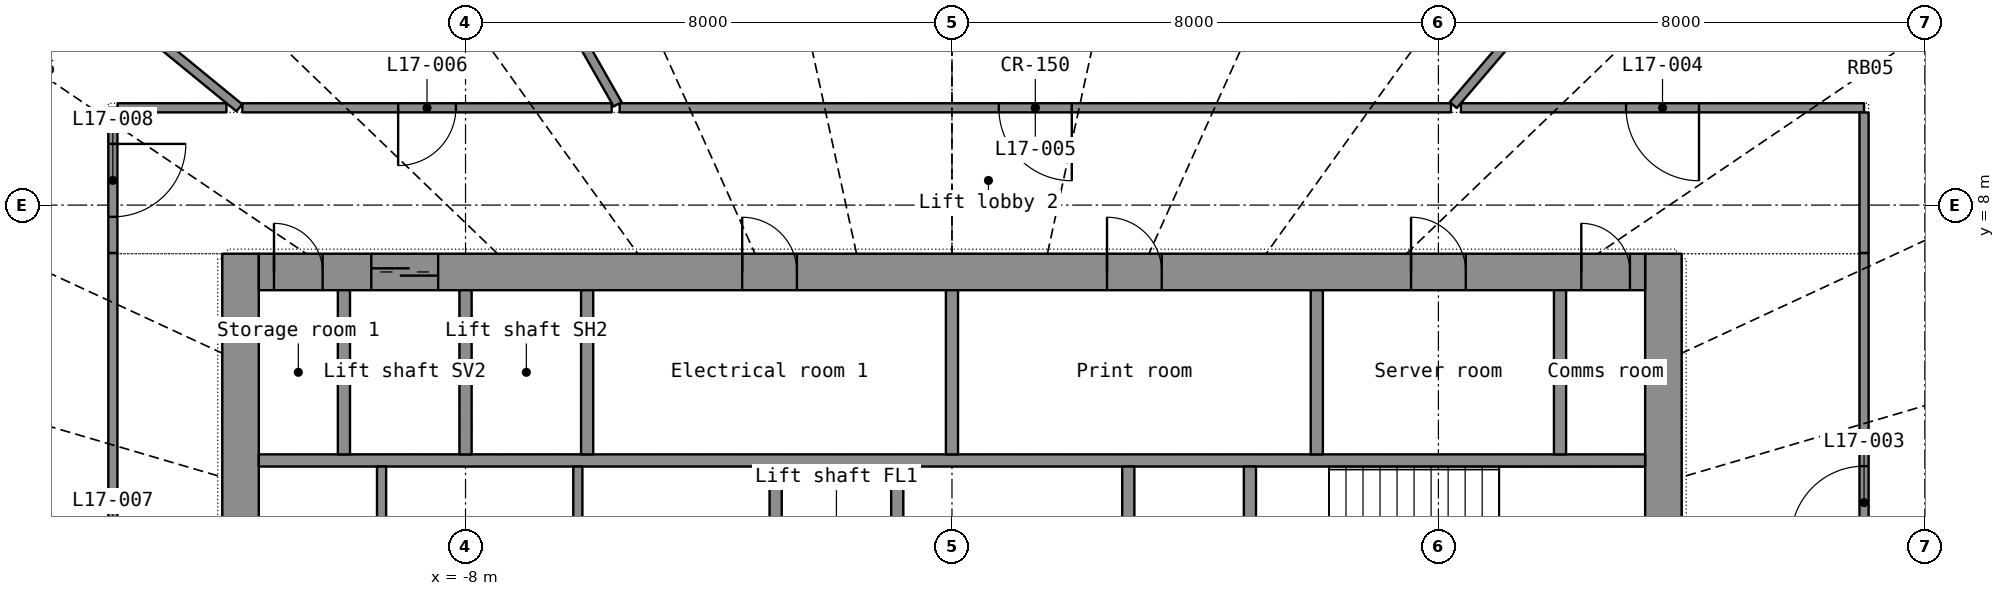
"""IFC4 building model, lengths in metres.
Left out: names, types, materials, properties, quantities, classifications, styles, units other than length and angle.
Written with IfcOpenShell. Run it as: python <this file> out.ifc"""

import sys

from ifc_helpers import new_model, si_unit, direction, frame, frame_2d, origin, place, context, subcontext, project, spatial, rectangle, extrude, element, fill, save


model = new_model("IFC4")
c1 = context("Model", 3, precision=1e-05, world=origin(), true_north=direction((0.0, 1.0)))
c2 = subcontext(c1, "Body", "Model", "MODEL_VIEW")
j1 = project(units=[si_unit("LENGTHUNIT", "METRE"), si_unit("PLANEANGLEUNIT", "RADIAN")], contexts=[c1])
p1 = place(None, origin())
s1 = spatial("IfcSite", under=j1, at=p1, CompositionType="ELEMENT")
p2 = place(p1, origin())
s2 = spatial("IfcBuilding", under=s1, at=p2, CompositionType="ELEMENT")
p3 = place(p2, frame((0.0, 0.0, 74.1)))
s3 = spatial("IfcBuildingStorey", under=s2, at=p3, CompositionType="ELEMENT", Elevation=74.1)
p4 = place(p3, frame((-11.7, -7.2, 0.0), z_axis=(0.0, 0.0, 1.0), x_axis=(0.0, 1.0, 0.0)))
e1 = element("IfcWall", 1, at=p4, inside=s3, PredefinedType="SHEAR", context=c2, shape_type="SweptSolid", body=[
    extrude(rectangle(XDim=14.4, YDim=0.6, at=frame_2d((7.2, 0.0))), origin(), (0.0, 0.0, 1.0), 3.3),
])
p5 = place(p4, frame((6.5, 0.0, 0.0)))
e2 = element("IfcOpeningElement", 2, at=p5, cuts=e1, PredefinedType="OPENING", context=c2, shape_type="SweptSolid", body=[
    extrude(rectangle(XDim=1.4, YDim=2.2, at=frame_2d((0.7, 1.1))), frame((0.0, 0.31, 0.0), z_axis=(0.0, -1.0, 0.0), x_axis=(1.0, 0.0, 0.0)), (0.0, 0.0, 1.0), 0.62),
])
p6 = place(p3, frame((11.7, -7.2, 0.0), z_axis=(0.0, 0.0, 1.0), x_axis=(0.0, 1.0, 0.0)))
e3 = element("IfcWall", 3, at=p6, inside=s3, PredefinedType="SHEAR", context=c2, shape_type="SweptSolid", body=[
    extrude(rectangle(XDim=14.4, YDim=0.6, at=frame_2d((7.2, 0.0))), origin(), (0.0, 0.0, 1.0), 3.3),
])
p7 = place(p6, frame((6.5, 0.0, 0.0)))
e4 = element("IfcOpeningElement", 4, at=p7, cuts=e3, PredefinedType="OPENING", context=c2, shape_type="SweptSolid", body=[
    extrude(rectangle(XDim=1.4, YDim=2.2, at=frame_2d((0.7, 1.1))), frame((0.0, 0.31, 0.0), z_axis=(0.0, -1.0, 0.0), x_axis=(1.0, 0.0, 0.0)), (0.0, 0.0, 1.0), 0.62),
])
p8 = place(p3, frame((-11.4, 6.9, 0.0), z_axis=(0.0, 0.0, 1.0), x_axis=(1.0, 0.0, 0.0)))
e5 = element("IfcWall", 5, at=p8, inside=s3, PredefinedType="SHEAR", context=c2, shape_type="SweptSolid", body=[
    extrude(rectangle(XDim=22.8, YDim=0.6, at=frame_2d((11.4, 0.0))), origin(), (0.0, 0.0, 1.0), 3.3),
])
p9 = place(p8, frame((1.85, 0.0, 0.0)))
e6 = element("IfcOpeningElement", 6, at=p9, cuts=e5, PredefinedType="OPENING", context=c2, shape_type="SweptSolid", body=[
    extrude(rectangle(XDim=1.1, YDim=2.2, at=frame_2d((0.55, 1.1))), frame((0.0, 0.31, 0.0), z_axis=(0.0, -1.0, 0.0), x_axis=(1.0, 0.0, 0.0)), (0.0, 0.0, 1.0), 0.62),
])
p10 = place(p8, frame((7.95, 0.0, 0.0)))
e7 = element("IfcOpeningElement", 7, at=p10, cuts=e5, PredefinedType="OPENING", context=c2, shape_type="SweptSolid", body=[
    extrude(rectangle(XDim=0.9, YDim=2.1, at=frame_2d((0.45, 1.05))), frame((0.0, 0.31, 0.0), z_axis=(0.0, -1.0, 0.0), x_axis=(1.0, 0.0, 0.0)), (0.0, 0.0, 1.0), 0.62),
])
p11 = place(p8, frame((13.95, 0.0, 0.0)))
e8 = element("IfcOpeningElement", 8, at=p11, cuts=e5, PredefinedType="OPENING", context=c2, shape_type="SweptSolid", body=[
    extrude(rectangle(XDim=0.9, YDim=2.1, at=frame_2d((0.45, 1.05))), frame((0.0, 0.31, 0.0), z_axis=(0.0, -1.0, 0.0), x_axis=(1.0, 0.0, 0.0)), (0.0, 0.0, 1.0), 0.62),
])
p12 = place(p8, frame((18.95, 0.0, 0.0)))
e9 = element("IfcOpeningElement", 9, at=p12, cuts=e5, PredefinedType="OPENING", context=c2, shape_type="SweptSolid", body=[
    extrude(rectangle(XDim=0.9, YDim=2.1, at=frame_2d((0.45, 1.05))), frame((0.0, 0.31, 0.0), z_axis=(0.0, -1.0, 0.0), x_axis=(1.0, 0.0, 0.0)), (0.0, 0.0, 1.0), 0.62),
])
p13 = place(p8, frame((0.25, 0.0, 0.0)))
e10 = element("IfcOpeningElement", 10, at=p13, cuts=e5, PredefinedType="OPENING", context=c2, shape_type="SweptSolid", body=[
    extrude(rectangle(XDim=0.8, YDim=2.05, at=frame_2d((0.4, 1.025))), frame((0.0, 0.31, 0.0), z_axis=(0.0, -1.0, 0.0), x_axis=(1.0, 0.0, 0.0)), (0.0, 0.0, 1.0), 0.62),
])
p14 = place(p8, frame((21.75, 0.0, 0.0)))
e11 = element("IfcOpeningElement", 11, at=p14, cuts=e5, PredefinedType="OPENING", context=c2, shape_type="SweptSolid", body=[
    extrude(rectangle(XDim=0.8, YDim=2.05, at=frame_2d((0.4, 1.025))), frame((0.0, 0.31, 0.0), z_axis=(0.0, -1.0, 0.0), x_axis=(1.0, 0.0, 0.0)), (0.0, 0.0, 1.0), 0.62),
])
p15 = place(p3, frame((-11.4, 3.8, 0.0), z_axis=(0.0, 0.0, 1.0), x_axis=(1.0, 0.0, 0.0)))
e12 = element("IfcWall", 12, at=p15, inside=s3, PredefinedType="SHEAR", context=c2, shape_type="SweptSolid", body=[
    extrude(rectangle(XDim=22.8, YDim=0.2, at=frame_2d((11.4, 0.0))), origin(), (0.0, 0.0, 1.0), 3.3),
])
for number, where, z_axis, x_axis in (
    (13, (-10.0, 3.9, 0.0), (0.0, 0.0, 1.0), (0.0, 1.0, 0.0)),
    (14, (-8.0, 3.9, 0.0), (0.0, 0.0, 1.0), (0.0, 1.0, 0.0)),
    (15, (-6.0, 3.9, 0.0), (0.0, 0.0, 1.0), (0.0, 1.0, 0.0)),
    (16, (10.0, 3.9, 0.0), (0.0, 0.0, 1.0), (0.0, 1.0, 0.0)),
):
    element("IfcWall", number, at=place(p3, frame(where, z_axis=z_axis, x_axis=x_axis)), inside=s3, PredefinedType="SHEAR", context=c2, shape_type="SweptSolid", body=[
        extrude(rectangle(XDim=2.7, YDim=0.2, at=frame_2d((1.35, 0.0))), origin(), (0.0, 0.0, 1.0), 3.3),
    ])
for number, where, z_axis, x_axis in (
    (17, (0.0, 3.9, 0.0), (0.0, 0.0, 1.0), (0.0, 1.0, 0.0)),
    (18, (6.0, 3.9, 0.0), (0.0, 0.0, 1.0), (0.0, 1.0, 0.0)),
):
    element("IfcWall", number, at=place(p3, frame(where, z_axis=z_axis, x_axis=x_axis)), inside=s3, PredefinedType="PARTITIONING", context=c2, shape_type="SweptSolid", body=[
        extrude(rectangle(XDim=2.7, YDim=0.2, at=frame_2d((1.35, 0.0))), origin(), (0.0, 0.0, 1.0), 3.3),
    ])
p16 = place(p3, frame((-2.9, -3.7, 0.0), z_axis=(0.0, 0.0, 1.0), x_axis=(0.0, 1.0, 0.0)))
e19 = element("IfcWall", 19, at=p16, inside=s3, PredefinedType="SHEAR", context=c2, shape_type="SweptSolid", body=[
    extrude(rectangle(XDim=7.4, YDim=0.2, at=frame_2d((3.7, 0.0))), origin(), (0.0, 0.0, 1.0), 3.3),
])
p17 = place(p16, frame((3.1, 0.0, 0.0)))
e20 = element("IfcOpeningElement", 20, at=p17, cuts=e19, PredefinedType="OPENING", context=c2, shape_type="SweptSolid", body=[
    extrude(rectangle(XDim=1.2, YDim=2.2, at=frame_2d((0.6, 1.1))), frame((0.0, 0.11, 0.0), z_axis=(0.0, -1.0, 0.0), x_axis=(1.0, 0.0, 0.0)), (0.0, 0.0, 1.0), 0.22),
])
p18 = place(p3, frame((2.9, -3.7, 0.0), z_axis=(0.0, 0.0, 1.0), x_axis=(0.0, 1.0, 0.0)))
e21 = element("IfcWall", 21, at=p18, inside=s3, PredefinedType="SHEAR", context=c2, shape_type="SweptSolid", body=[
    extrude(rectangle(XDim=7.4, YDim=0.2, at=frame_2d((3.7, 0.0))), origin(), (0.0, 0.0, 1.0), 3.3),
])
p19 = place(p18, frame((3.1, 0.0, 0.0)))
e22 = element("IfcOpeningElement", 22, at=p19, cuts=e21, PredefinedType="OPENING", context=c2, shape_type="SweptSolid", body=[
    extrude(rectangle(XDim=1.2, YDim=2.2, at=frame_2d((0.6, 1.1))), frame((0.0, 0.11, 0.0), z_axis=(0.0, -1.0, 0.0), x_axis=(1.0, 0.0, 0.0)), (0.0, 0.0, 1.0), 0.22),
])
for number, where, z_axis, x_axis in (
    (23, (-0.9, 1.35, 0.0), (0.0, 0.0, 1.0), (0.0, 1.0, 0.0)),
    (24, (4.9, 1.35, 0.0), (0.0, 0.0, 1.0), (0.0, 1.0, 0.0)),
):
    element("IfcWall", number, at=place(p3, frame(where, z_axis=z_axis, x_axis=x_axis)), inside=s3, PredefinedType="SHEAR", context=c2, shape_type="SweptSolid", body=[
        extrude(rectangle(XDim=2.35, YDim=0.2, at=frame_2d((1.175, 0.0))), origin(), (0.0, 0.0, 1.0), 3.3),
    ])
for number, where, z_axis, x_axis in (
    (25, (-9.381, 1.35, 0.0), (0.0, 0.0, 1.0), (0.0, 1.0, 0.0)),
    (26, (-6.153, 1.35, 0.0), (0.0, 0.0, 1.0), (0.0, 1.0, 0.0)),
):
    element("IfcWall", number, at=place(p3, frame(where, z_axis=z_axis, x_axis=x_axis)), inside=s3, PredefinedType="PARTITIONING", context=c2, shape_type="SweptSolid", body=[
        extrude(rectangle(XDim=2.35, YDim=0.15, at=frame_2d((1.175, 0.0))), origin(), (0.0, 0.0, 1.0), 3.3),
    ])
p20 = place(p3, frame((8.206, 9.6, 0.0), z_axis=(0.0, 0.0, 1.0), x_axis=(-1.0, 0.0, 0.0)))
e27 = element("IfcWall", 27, at=p20, inside=s3, PredefinedType="PARTITIONING", context=c2, shape_type="SweptSolid", body=[
    extrude(rectangle(XDim=13.671, YDim=0.15, at=frame_2d((6.836, 0.0))), origin(), (0.0, 0.0, 1.0), 2.4),
])
p21 = place(p20, frame((6.236, 0.0, 0.0)))
e28 = element("IfcOpeningElement", 28, at=p21, cuts=e27, PredefinedType="OPENING", context=c2, shape_type="SweptSolid", body=[
    extrude(rectangle(XDim=1.2, YDim=2.2, at=frame_2d((0.6, 1.1))), frame((0.0, 0.085, 0.0), z_axis=(0.0, -1.0, 0.0), x_axis=(1.0, 0.0, 0.0)), (0.0, 0.0, 1.0), 0.17),
])
p22 = place(p3, frame((-11.314, 19.874, 0.0), z_axis=(0.0, 0.0, 1.0), x_axis=(0.49473362, -0.869044674, 0.0)))
e29 = element("IfcWall", 29, at=p22, inside=s3, PredefinedType="PARTITIONING", context=c2, shape_type="SweptSolid", body=[
    extrude(rectangle(XDim=11.755, YDim=0.15, at=frame_2d((5.877, 0.0))), origin(), (0.0, 0.0, 1.0), 2.4),
])
p23 = place(p3, frame((15.357, 17.965, 0.0), z_axis=(0.0, 0.0, 1.0), x_axis=(-0.649780526, -0.760121877, 0.0)))
e30 = element("IfcWall", 30, at=p23, inside=s3, PredefinedType="PARTITIONING", context=c2, shape_type="SweptSolid", body=[
    extrude(rectangle(XDim=10.946, YDim=0.15, at=frame_2d((5.473, 0.0))), origin(), (0.0, 0.0, 1.0), 2.4),
])
p24 = place(p3, frame((-13.8, 7.212, 0.0), z_axis=(0.0, 0.0, 1.0), x_axis=(0.0, -1.0, 0.0)))
e31 = element("IfcWall", 31, at=p24, inside=s3, PredefinedType="PARTITIONING", context=c2, shape_type="SweptSolid", body=[
    extrude(rectangle(XDim=10.166, YDim=0.15, at=frame_2d((5.083, 0.0))), origin(), (0.0, 0.0, 1.0), 2.4),
])
p25 = place(p24, frame((4.483, 0.0, 0.0)))
e32 = element("IfcOpeningElement", 32, at=p25, cuts=e31, PredefinedType="OPENING", context=c2, shape_type="SweptSolid", body=[
    extrude(rectangle(XDim=1.2, YDim=2.2, at=frame_2d((0.6, 1.1))), frame((0.0, 0.085, 0.0), z_axis=(0.0, -1.0, 0.0), x_axis=(1.0, 0.0, 0.0)), (0.0, 0.0, 1.0), 0.17),
])
p26 = place(p3, frame((-18.937, 15.511, 0.0), z_axis=(0.0, 0.0, 1.0), x_axis=(0.773614383, -0.633656678, 0.0)))
e33 = element("IfcWall", 33, at=p26, inside=s3, PredefinedType="PARTITIONING", context=c2, shape_type="SweptSolid", body=[
    extrude(rectangle(XDim=9.329, YDim=0.15, at=frame_2d((4.665, 0.0))), origin(), (0.0, 0.0, 1.0), 2.4),
])
p27 = place(p3, frame((15.0, -0.998, 0.0), z_axis=(0.0, 0.0, 1.0), x_axis=(0.0, 1.0, 0.0)))
e34 = element("IfcWall", 34, at=p27, inside=s3, PredefinedType="PARTITIONING", context=c2, shape_type="SweptSolid", body=[
    extrude(rectangle(XDim=8.21, YDim=0.15, at=frame_2d((4.105, 0.0))), origin(), (0.0, 0.0, 1.0), 2.4),
])
p28 = place(p27, frame((3.505, 0.0, 0.0)))
e35 = element("IfcOpeningElement", 35, at=p28, cuts=e34, PredefinedType="OPENING", context=c2, shape_type="SweptSolid", body=[
    extrude(rectangle(XDim=1.2, YDim=2.2, at=frame_2d((0.6, 1.1))), frame((0.0, 0.085, 0.0), z_axis=(0.0, -1.0, 0.0), x_axis=(1.0, 0.0, 0.0)), (0.0, 0.0, 1.0), 0.17),
])
p29 = place(p3, frame((15.0, 9.6, 0.0), z_axis=(0.0, 0.0, 1.0), x_axis=(-1.0, 0.0, 0.0)))
e36 = element("IfcWall", 36, at=p29, inside=s3, PredefinedType="PARTITIONING", context=c2, shape_type="SweptSolid", body=[
    extrude(rectangle(XDim=6.629, YDim=0.15, at=frame_2d((3.314, 0.0))), origin(), (0.0, 0.0, 1.0), 2.4),
])
p30 = place(p29, frame((2.714, 0.0, 0.0)))
e37 = element("IfcOpeningElement", 37, at=p30, cuts=e36, PredefinedType="OPENING", context=c2, shape_type="SweptSolid", body=[
    extrude(rectangle(XDim=1.2, YDim=2.2, at=frame_2d((0.6, 1.1))), frame((0.0, 0.085, 0.0), z_axis=(0.0, -1.0, 0.0), x_axis=(1.0, 0.0, 0.0)), (0.0, 0.0, 1.0), 0.17),
])
p31 = place(p3, frame((-5.596, 9.6, 0.0), z_axis=(0.0, 0.0, 1.0), x_axis=(-1.0, 0.0, 0.0)))
e38 = element("IfcWall", 38, at=p31, inside=s3, PredefinedType="PARTITIONING", context=c2, shape_type="SweptSolid", body=[
    extrude(rectangle(XDim=6.074, YDim=0.15, at=frame_2d((3.037, 0.0))), origin(), (0.0, 0.0, 1.0), 2.4),
])
p32 = place(p31, frame((2.562, 0.0, 0.0)))
e39 = element("IfcOpeningElement", 39, at=p32, cuts=e38, PredefinedType="OPENING", context=c2, shape_type="SweptSolid", body=[
    extrude(rectangle(XDim=0.95, YDim=2.15, at=frame_2d((0.475, 1.075))), frame((0.0, 0.085, 0.0), z_axis=(0.0, -1.0, 0.0), x_axis=(1.0, 0.0, 0.0)), (0.0, 0.0, 1.0), 0.17),
])
p33 = place(p3, frame((-13.8, 9.6, 0.0), z_axis=(0.0, 0.0, 1.0), x_axis=(0.0, -1.0, 0.0)))
e40 = element("IfcWall", 40, at=p33, inside=s3, PredefinedType="PARTITIONING", context=c2, shape_type="SweptSolid", body=[
    extrude(rectangle(XDim=2.387, YDim=0.15, at=frame_2d((1.194, 0.0))), origin(), (0.0, 0.0, 1.0), 2.4),
])
p34 = place(p33, frame((0.594, 0.0, 0.0)))
e41 = element("IfcOpeningElement", 41, at=p34, cuts=e40, PredefinedType="OPENING", context=c2, shape_type="SweptSolid", body=[
    extrude(rectangle(XDim=1.2, YDim=2.2, at=frame_2d((0.6, 1.1))), frame((0.0, 0.085, 0.0), z_axis=(0.0, -1.0, 0.0), x_axis=(1.0, 0.0, 0.0)), (0.0, 0.0, 1.0), 0.17),
])
p35 = place(p3, frame((15.0, 7.213, 0.0), z_axis=(0.0, 0.0, 1.0), x_axis=(0.0, 1.0, 0.0)))
e42 = element("IfcWall", 42, at=p35, inside=s3, PredefinedType="PARTITIONING", context=c2, shape_type="SweptSolid", body=[
    extrude(rectangle(XDim=2.31, YDim=0.15, at=frame_2d((1.155, 0.0))), origin(), (0.0, 0.0, 1.0), 2.4),
])
p36 = place(p3, frame((-11.932, 9.6, 0.0), z_axis=(0.0, 0.0, 1.0), x_axis=(-1.0, 0.0, 0.0)))
e43 = element("IfcWall", 43, at=p36, inside=s3, PredefinedType="PARTITIONING", context=c2, shape_type="SweptSolid", body=[
    extrude(rectangle(XDim=1.791, YDim=0.15, at=frame_2d((0.896, 0.0))), origin(), (0.0, 0.0, 1.0), 2.4),
])
p37 = place(p9, origin())
e44 = element("IfcDoor", 44, at=p37, inside=s3, OperationType="DOUBLE_DOOR_SLIDING", PredefinedType="DOOR", context=c2, shape_type="SweptSolid", body=[
    extrude(rectangle(XDim=1.1, YDim=2.2, at=frame_2d((0.55, 1.1))), frame((0.0, 0.025, 0.0), z_axis=(0.0, -1.0, 0.0), x_axis=(1.0, 0.0, 0.0)), (0.0, 0.0, 1.0), 0.05),
])
fill(e6, e44)
p38 = place(p10, origin())
e45 = element("IfcDoor", 45, at=p38, inside=s3, OperationType="SINGLE_SWING_LEFT", PredefinedType="DOOR", context=c2, shape_type="SweptSolid", body=[
    extrude(rectangle(XDim=0.9, YDim=2.1, at=frame_2d((0.45, 1.05))), frame((0.0, 0.025, 0.0), z_axis=(0.0, -1.0, 0.0), x_axis=(1.0, 0.0, 0.0)), (0.0, 0.0, 1.0), 0.05),
])
fill(e7, e45)
p39 = place(p11, origin())
e46 = element("IfcDoor", 46, at=p39, inside=s3, OperationType="SINGLE_SWING_LEFT", PredefinedType="DOOR", context=c2, shape_type="SweptSolid", body=[
    extrude(rectangle(XDim=0.9, YDim=2.1, at=frame_2d((0.45, 1.05))), frame((0.0, 0.025, 0.0), z_axis=(0.0, -1.0, 0.0), x_axis=(1.0, 0.0, 0.0)), (0.0, 0.0, 1.0), 0.05),
])
fill(e8, e46)
p40 = place(p12, origin())
e47 = element("IfcDoor", 47, at=p40, inside=s3, OperationType="SINGLE_SWING_LEFT", PredefinedType="DOOR", context=c2, shape_type="SweptSolid", body=[
    extrude(rectangle(XDim=0.9, YDim=2.1, at=frame_2d((0.45, 1.05))), frame((0.0, 0.025, 0.0), z_axis=(0.0, -1.0, 0.0), x_axis=(1.0, 0.0, 0.0)), (0.0, 0.0, 1.0), 0.05),
])
fill(e9, e47)
p41 = place(p13, origin())
e48 = element("IfcDoor", 48, at=p41, inside=s3, OperationType="SINGLE_SWING_LEFT", PredefinedType="DOOR", context=c2, shape_type="SweptSolid", body=[
    extrude(rectangle(XDim=0.8, YDim=2.05, at=frame_2d((0.4, 1.025))), frame((0.0, 0.025, 0.0), z_axis=(0.0, -1.0, 0.0), x_axis=(1.0, 0.0, 0.0)), (0.0, 0.0, 1.0), 0.05),
])
fill(e10, e48)
p42 = place(p14, origin())
e49 = element("IfcDoor", 49, at=p42, inside=s3, OperationType="SINGLE_SWING_LEFT", PredefinedType="DOOR", context=c2, shape_type="SweptSolid", body=[
    extrude(rectangle(XDim=0.8, YDim=2.05, at=frame_2d((0.4, 1.025))), frame((0.0, 0.025, 0.0), z_axis=(0.0, -1.0, 0.0), x_axis=(1.0, 0.0, 0.0)), (0.0, 0.0, 1.0), 0.05),
])
fill(e11, e49)
p43 = place(p28, origin())
e50 = element("IfcDoor", 50, at=p43, inside=s3, OperationType="DOUBLE_DOOR_SINGLE_SWING", PredefinedType="DOOR", context=c2, shape_type="SweptSolid", body=[
    extrude(rectangle(XDim=1.2, YDim=2.2, at=frame_2d((0.6, 1.1))), frame((0.0, 0.025, 0.0), z_axis=(0.0, -1.0, 0.0), x_axis=(1.0, 0.0, 0.0)), (0.0, 0.0, 1.0), 0.05),
])
fill(e35, e50)
p44 = place(p30, origin())
e51 = element("IfcDoor", 51, at=p44, inside=s3, OperationType="DOUBLE_DOOR_SINGLE_SWING", PredefinedType="DOOR", context=c2, shape_type="SweptSolid", body=[
    extrude(rectangle(XDim=1.2, YDim=2.2, at=frame_2d((0.6, 1.1))), frame((0.0, 0.025, 0.0), z_axis=(0.0, -1.0, 0.0), x_axis=(1.0, 0.0, 0.0)), (0.0, 0.0, 1.0), 0.05),
])
fill(e37, e51)
p45 = place(p21, origin())
e52 = element("IfcDoor", 52, at=p45, inside=s3, OperationType="DOUBLE_DOOR_SINGLE_SWING", PredefinedType="DOOR", context=c2, shape_type="SweptSolid", body=[
    extrude(rectangle(XDim=1.2, YDim=2.2, at=frame_2d((0.6, 1.1))), frame((0.0, 0.025, 0.0), z_axis=(0.0, -1.0, 0.0), x_axis=(1.0, 0.0, 0.0)), (0.0, 0.0, 1.0), 0.05),
])
fill(e28, e52)
p46 = place(p32, origin())
e53 = element("IfcDoor", 53, at=p46, inside=s3, OperationType="SINGLE_SWING_RIGHT", PredefinedType="DOOR", context=c2, shape_type="SweptSolid", body=[
    extrude(rectangle(XDim=0.95, YDim=2.15, at=frame_2d((0.475, 1.075))), frame((0.0, 0.025, 0.0), z_axis=(0.0, -1.0, 0.0), x_axis=(1.0, 0.0, 0.0)), (0.0, 0.0, 1.0), 0.05),
])
fill(e39, e53)
p47 = place(p34, origin())
e54 = element("IfcDoor", 54, at=p47, inside=s3, OperationType="DOUBLE_DOOR_SINGLE_SWING", PredefinedType="DOOR", context=c2, shape_type="SweptSolid", body=[
    extrude(rectangle(XDim=1.2, YDim=2.2, at=frame_2d((0.6, 1.1))), frame((0.0, 0.025, 0.0), z_axis=(0.0, -1.0, 0.0), x_axis=(1.0, 0.0, 0.0)), (0.0, 0.0, 1.0), 0.05),
])
fill(e41, e54)
save(model, sys.argv[1])
